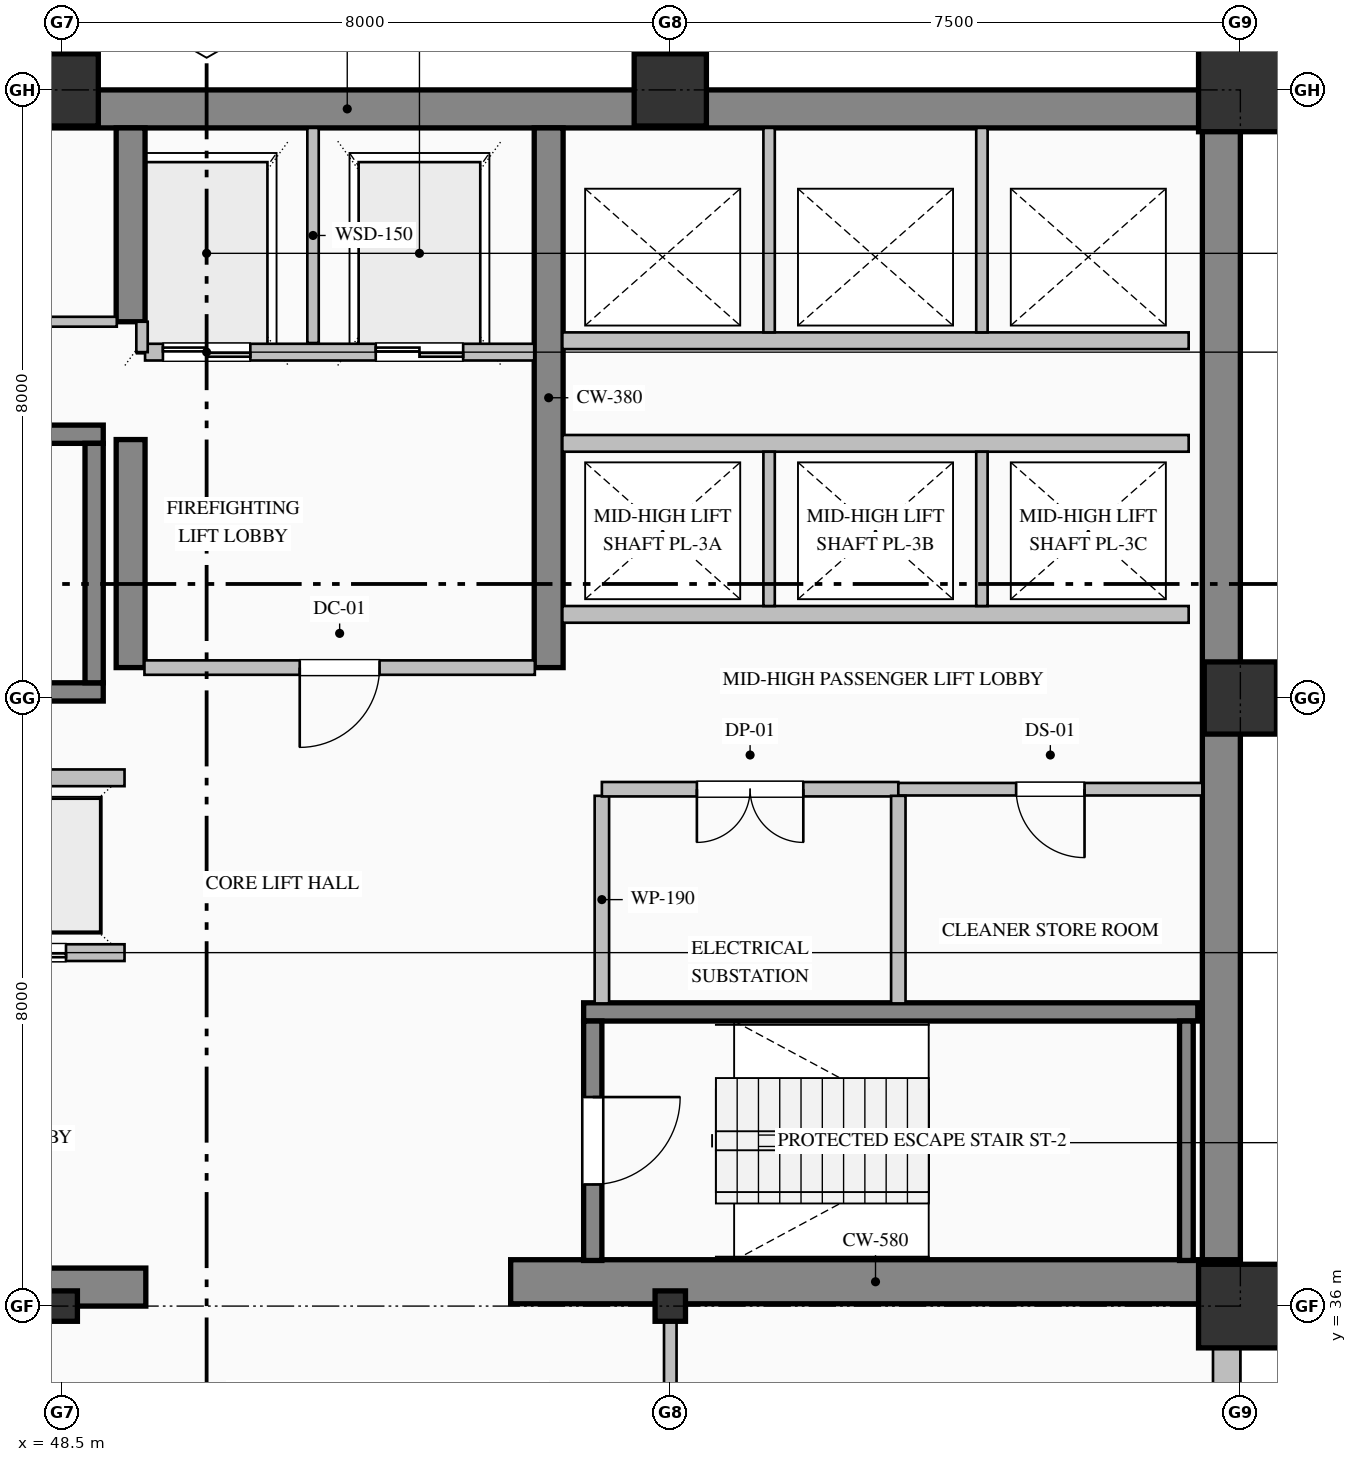
"""IFC4 building model, lengths in metres.
Left out: names, types, materials, properties, quantities, classifications, styles, units other than length and angle.
Written with IfcOpenShell. Run it as: python <this file> out.ifc"""

import sys

from ifc_helpers import new_model, si_unit, direction, frame, frame_2d, origin, origin_2d, place, context, subcontext, project, spatial, rectangle, hollow_rectangle, i_section, extrude, element, fill, save


model = new_model("IFC4")
c1 = context("Model", 3, precision=1e-05, world=origin(), true_north=direction((0.0, 1.0)))
c2 = subcontext(c1, "Body", "Model", "MODEL_VIEW")
j1 = project(units=[si_unit("LENGTHUNIT", "METRE"), si_unit("PLANEANGLEUNIT", "RADIAN")], contexts=[c1])
p1 = place(None, origin())
s1 = spatial("IfcSite", under=j1, at=p1, CompositionType="ELEMENT")
p2 = place(p1, origin())
s2 = spatial("IfcBuilding", under=s1, at=p2, CompositionType="ELEMENT")
p3 = place(p2, frame((0.0, 0.0, 167.0)))
s3 = spatial("IfcBuildingStorey", under=s2, at=p3, CompositionType="ELEMENT", Elevation=167.0)
p4 = place(p3, frame((40.5, 51.75, 0.0), z_axis=(0.0, 0.0, 1.0), x_axis=(1.0, 0.0, 0.0)))
e1 = element("IfcWall", 1, at=p4, inside=s3, PredefinedType="SHEAR", context=c2, shape_type="SweptSolid", body=[
    extrude(rectangle(XDim=23.5, YDim=0.5, at=frame_2d((11.75, 0.0))), origin(), (0.0, 0.0, 1.0), 3.765),
])
p5 = place(p3, frame((63.75, 36.32, 0.0), z_axis=(0.0, 0.0, 1.0), x_axis=(0.0, 1.0, 0.0)))
e2 = element("IfcWall", 2, at=p5, inside=s3, PredefinedType="SHEAR", context=c2, shape_type="SweptSolid", body=[
    extrude(rectangle(XDim=15.18, YDim=0.5, at=frame_2d((7.59, 0.0))), origin(), (0.0, 0.0, 1.0), 3.765),
])
p6 = place(p3, frame((40.5, 36.25, 0.0), z_axis=(0.0, 0.0, 1.0), x_axis=(1.0, 0.0, 0.0)))
e3 = element("IfcWall", 3, at=p6, inside=s3, PredefinedType="SHEAR", context=c2, shape_type="SweptSolid", body=[
    extrude(rectangle(XDim=9.1, YDim=0.5, at=frame_2d((4.55, 0.0))), origin(), (0.0, 0.0, 1.0), 3.765),
])
p7 = place(p3, frame((54.4, 36.32, 0.0), z_axis=(0.0, 0.0, 1.0), x_axis=(1.0, 0.0, 0.0)))
e4 = element("IfcWall", 4, at=p7, inside=s3, PredefinedType="SHEAR", context=c2, shape_type="SweptSolid", body=[
    extrude(rectangle(XDim=9.6, YDim=0.58, at=frame_2d((4.8, 0.0))), origin(), (0.0, 0.0, 1.0), 4.0),
])
p8 = place(p3, frame((49.4, 44.4, 0.0), z_axis=(0.0, 0.0, 1.0), x_axis=(0.0, 1.0, 0.0)))
e5 = element("IfcWall", 5, at=p8, inside=s3, PredefinedType="SHEAR", context=c2, shape_type="SweptSolid", body=[
    extrude(rectangle(XDim=3.0, YDim=0.38, at=frame_2d((1.5, 0.0))), origin(), (0.0, 0.0, 1.0), 3.765),
])
p9 = place(p3, frame((49.4, 48.95, 0.0), z_axis=(0.0, 0.0, 1.0), x_axis=(0.0, 1.0, 0.0)))
e6 = element("IfcWall", 6, at=p9, inside=s3, PredefinedType="SHEAR", context=c2, shape_type="SweptSolid", body=[
    extrude(rectangle(XDim=2.55, YDim=0.38, at=frame_2d((1.275, 0.0))), origin(), (0.0, 0.0, 1.0), 3.765),
])
p10 = place(p3, frame((54.9, 44.4, 0.0), z_axis=(0.0, 0.0, 1.0), x_axis=(0.0, 1.0, 0.0)))
e7 = element("IfcWall", 7, at=p10, inside=s3, PredefinedType="SHEAR", context=c2, shape_type="SweptSolid", body=[
    extrude(rectangle(XDim=7.1, YDim=0.38, at=frame_2d((3.55, 0.0))), origin(), (0.0, 0.0, 1.0), 3.765),
])
p11 = place(p3, frame((48.5, 36.0, 0.0), z_axis=(0.0, 0.0, 1.0), x_axis=(1.0, 0.0, 0.0)))
e8 = element("IfcColumn", 8, at=p11, inside=s3, PredefinedType="COLUMN", context=c2, shape_type="SweptSolid", body=[
    extrude(i_section(OverallWidth=0.4, OverallDepth=0.4, WebThickness=0.013, FlangeThickness=0.021, FilletRadius=0.022, at=origin_2d()), origin(), (0.0, 0.0, 1.0), 4.0),
])
p12 = place(p3, frame((48.5, 52.0, 0.0), z_axis=(0.0, 0.0, 1.0), x_axis=(1.0, 0.0, 0.0)))
e9 = element("IfcColumn", 9, at=p12, inside=s3, PredefinedType="COLUMN", context=c2, shape_type="SweptSolid", body=[
    extrude(hollow_rectangle(XDim=0.95, YDim=0.95, WallThickness=0.036, at=origin_2d()), origin(), (0.0, 0.0, 1.0), 4.0),
])
p13 = place(p3, frame((56.5, 36.0, 0.0), z_axis=(0.0, 0.0, 1.0), x_axis=(1.0, 0.0, 0.0)))
e10 = element("IfcColumn", 10, at=p13, inside=s3, PredefinedType="COLUMN", context=c2, shape_type="SweptSolid", body=[
    extrude(i_section(OverallWidth=0.4, OverallDepth=0.4, WebThickness=0.013, FlangeThickness=0.021, FilletRadius=0.022, at=origin_2d()), origin(), (0.0, 0.0, 1.0), 4.0),
])
p14 = place(p3, frame((56.5, 52.0, 0.0), z_axis=(0.0, 0.0, 1.0), x_axis=(1.0, 0.0, 0.0)))
e11 = element("IfcColumn", 11, at=p14, inside=s3, PredefinedType="COLUMN", context=c2, shape_type="SweptSolid", body=[
    extrude(hollow_rectangle(XDim=0.95, YDim=0.95, WallThickness=0.036, at=origin_2d()), origin(), (0.0, 0.0, 1.0), 4.0),
])
p15 = place(p3, frame((64.0, 36.0, 0.0), z_axis=(0.0, 0.0, 1.0), x_axis=(1.0, 0.0, 0.0)))
e12 = element("IfcColumn", 12, at=p15, inside=s3, PredefinedType="COLUMN", context=c2, shape_type="SweptSolid", body=[
    extrude(hollow_rectangle(XDim=1.1, YDim=1.1, WallThickness=0.04, at=origin_2d()), origin(), (0.0, 0.0, 1.0), 4.0),
])
p16 = place(p3, frame((64.0, 44.0, 0.0), z_axis=(0.0, 0.0, 1.0), x_axis=(1.0, 0.0, 0.0)))
e13 = element("IfcColumn", 13, at=p16, inside=s3, PredefinedType="COLUMN", context=c2, shape_type="SweptSolid", body=[
    extrude(hollow_rectangle(XDim=0.95, YDim=0.95, WallThickness=0.036, at=origin_2d()), origin(), (0.0, 0.0, 1.0), 4.0),
])
p17 = place(p3, frame((64.0, 52.0, 0.0), z_axis=(0.0, 0.0, 1.0), x_axis=(1.0, 0.0, 0.0)))
e14 = element("IfcColumn", 14, at=p17, inside=s3, PredefinedType="COLUMN", context=c2, shape_type="SweptSolid", body=[
    extrude(hollow_rectangle(XDim=1.1, YDim=1.1, WallThickness=0.04, at=origin_2d()), origin(), (0.0, 0.0, 1.0), 4.0),
])
p18 = place(p3, frame((63.82, 36.05, 0.0), z_axis=(0.0, 0.0, 1.0), x_axis=(0.0, -1.0, 0.0)))
e15 = element("IfcWall", 15, at=p18, inside=s3, PredefinedType="SOLIDWALL", context=c2, shape_type="SweptSolid", body=[
    extrude(rectangle(XDim=28.05, YDim=0.36, at=frame_2d((14.025, 0.0))), origin(), (0.0, 0.0, 1.0), 3.265),
])
p19 = place(p18, frame((2.775, 0.0, 0.85)))
e16 = element("IfcOpeningElement", 16, at=p19, cuts=e15, PredefinedType="OPENING", context=c2, shape_type="SweptSolid", body=[
    extrude(rectangle(XDim=1.65, YDim=1.95, at=frame_2d((0.825, 0.975))), frame((0.0, 0.19, 0.0), z_axis=(0.0, -1.0, 0.0), x_axis=(1.0, 0.0, 0.0)), (0.0, 0.0, 1.0), 0.38),
])
p20 = place(p18, frame((13.575, 0.0, 0.85)))
e17 = element("IfcOpeningElement", 17, at=p20, cuts=e15, PredefinedType="OPENING", context=c2, shape_type="SweptSolid", body=[
    extrude(rectangle(XDim=1.65, YDim=1.95, at=frame_2d((0.825, 0.975))), frame((0.0, 0.19, 0.0), z_axis=(0.0, -1.0, 0.0), x_axis=(1.0, 0.0, 0.0)), (0.0, 0.0, 1.0), 0.38),
])
for number, where, z_axis, x_axis in (
    (18, (40.96, 47.47, 0.0), (0.0, 0.0, 1.0), (1.0, 0.0, 0.0)),
    (19, (49.04, 44.08, 0.0), (0.0, 0.0, 1.0), (-1.0, 0.0, 0.0)),
):
    element("IfcWall", number, at=place(p3, frame(where, z_axis=z_axis, x_axis=x_axis)), inside=s3, PredefinedType="SOLIDWALL", context=c2, shape_type="SweptSolid", body=[
        extrude(rectangle(XDim=8.08, YDim=0.24, at=frame_2d((4.04, 0.0))), origin(), (0.0, 0.0, 1.0), 4.0),
    ])
p21 = place(p3, frame((48.92, 44.2, 0.0), z_axis=(0.0, 0.0, 1.0), x_axis=(0.0, 1.0, 0.0)))
e20 = element("IfcWall", 20, at=p21, inside=s3, PredefinedType="SOLIDWALL", context=c2, shape_type="SweptSolid", body=[
    extrude(rectangle(XDim=3.15, YDim=0.24, at=frame_2d((1.575, 0.0))), origin(), (0.0, 0.0, 1.0), 4.0),
])
p22 = place(p3, frame((55.36, 39.87, 0.0), z_axis=(0.0, 0.0, 1.0), x_axis=(1.0, 0.0, 0.0)))
e21 = element("IfcWall", 21, at=p22, inside=s3, PredefinedType="SOLIDWALL", context=c2, shape_type="SweptSolid", body=[
    extrude(rectangle(XDim=8.08, YDim=0.24, at=frame_2d((4.04, 0.0))), origin(), (0.0, 0.0, 1.0), 4.0),
])
p23 = place(p3, frame((55.48, 39.75, 0.0), z_axis=(0.0, 0.0, 1.0), x_axis=(0.0, -1.0, 0.0)))
e22 = element("IfcWall", 22, at=p23, inside=s3, PredefinedType="SOLIDWALL", context=c2, shape_type="SweptSolid", body=[
    extrude(rectangle(XDim=3.15, YDim=0.24, at=frame_2d((1.575, 0.0))), origin(), (0.0, 0.0, 1.0), 4.0),
])
p24 = place(p23, frame((1.0, 0.0, 0.0)))
e23 = element("IfcOpeningElement", 23, at=p24, cuts=e22, PredefinedType="OPENING", context=c2, shape_type="SweptSolid", body=[
    extrude(rectangle(XDim=1.15, YDim=2.2, at=frame_2d((0.575, 1.1))), frame((0.0, 0.13, 0.0), z_axis=(0.0, -1.0, 0.0), x_axis=(1.0, 0.0, 0.0)), (0.0, 0.0, 1.0), 0.26),
])
p25 = place(p3, frame((63.29, 36.6, 0.0), z_axis=(0.0, 0.0, 1.0), x_axis=(0.0, 1.0, 0.0)))
e24 = element("IfcWall", 24, at=p25, inside=s3, PredefinedType="SOLIDWALL", context=c2, shape_type="SweptSolid", body=[
    extrude(rectangle(XDim=3.15, YDim=0.18, at=frame_2d((1.575, 0.0))), origin(), (0.0, 0.0, 1.0), 4.0),
])
p26 = place(p3, frame((54.71, 48.55, 0.0), z_axis=(0.0, 0.0, 1.0), x_axis=(-1.0, 0.0, 0.0)))
e25 = element("IfcWall", 25, at=p26, inside=s3, PredefinedType="PARTITIONING", context=c2, shape_type="SweptSolid", body=[
    extrude(rectangle(XDim=5.12, YDim=0.22, at=frame_2d((2.56, 0.0))), origin(), (0.0, 0.0, 1.0), 3.765),
])
p27 = place(p26, frame((3.735, 0.0, 0.0)))
e26 = element("IfcOpeningElement", 26, at=p27, cuts=e25, PredefinedType="OPENING", context=c2, shape_type="SweptSolid", body=[
    extrude(rectangle(XDim=1.15, YDim=2.2, at=frame_2d((0.575, 1.1))), frame((0.0, 0.12, 0.0), z_axis=(0.0, -1.0, 0.0), x_axis=(1.0, 0.0, 0.0)), (0.0, 0.0, 1.0), 0.24),
])
p28 = place(p26, frame((0.935, 0.0, 0.0)))
e27 = element("IfcOpeningElement", 27, at=p28, cuts=e25, PredefinedType="OPENING", context=c2, shape_type="SweptSolid", body=[
    extrude(rectangle(XDim=1.15, YDim=2.2, at=frame_2d((0.575, 1.1))), frame((0.0, 0.12, 0.0), z_axis=(0.0, -1.0, 0.0), x_axis=(1.0, 0.0, 0.0)), (0.0, 0.0, 1.0), 0.24),
])
p29 = place(p3, frame((51.8, 48.67, 0.0), z_axis=(0.0, 0.0, 1.0), x_axis=(0.0, 1.0, 0.0)))
e28 = element("IfcWall", 28, at=p29, inside=s3, PredefinedType="PARTITIONING", context=c2, shape_type="SweptSolid", body=[
    extrude(rectangle(XDim=2.83, YDim=0.15, at=frame_2d((1.415, 0.0))), origin(), (0.0, 0.0, 1.0), 3.765),
])
p30 = place(p3, frame((49.55, 48.55, 0.0), z_axis=(0.0, 0.0, 1.0), x_axis=(0.0, 1.0, 0.0)))
e29 = element("IfcWall", 29, at=p30, inside=s3, PredefinedType="PARTITIONING", context=c2, shape_type="SweptSolid", body=[
    extrude(rectangle(XDim=0.4, YDim=0.15, at=frame_2d((0.2, 0.0))), origin(), (0.0, 0.0, 1.0), 3.765),
])
p31 = place(p3, frame((49.32, 40.65, 0.0), z_axis=(0.0, 0.0, 1.0), x_axis=(-1.0, 0.0, 0.0)))
e30 = element("IfcWall", 30, at=p31, inside=s3, PredefinedType="PARTITIONING", context=c2, shape_type="SweptSolid", body=[
    extrude(rectangle(XDim=8.24, YDim=0.22, at=frame_2d((4.12, 0.0))), origin(), (0.0, 0.0, 1.0), 3.765),
])
p32 = place(p31, frame((6.37, 0.0, 0.0)))
e31 = element("IfcOpeningElement", 31, at=p32, cuts=e30, PredefinedType="OPENING", context=c2, shape_type="SweptSolid", body=[
    extrude(rectangle(XDim=1.1, YDim=2.2, at=frame_2d((0.55, 1.1))), frame((0.0, 0.12, 0.0), z_axis=(0.0, -1.0, 0.0), x_axis=(1.0, 0.0, 0.0)), (0.0, 0.0, 1.0), 0.24),
])
p33 = place(p31, frame((3.57, 0.0, 0.0)))
e32 = element("IfcOpeningElement", 32, at=p33, cuts=e30, PredefinedType="OPENING", context=c2, shape_type="SweptSolid", body=[
    extrude(rectangle(XDim=1.1, YDim=2.2, at=frame_2d((0.55, 1.1))), frame((0.0, 0.12, 0.0), z_axis=(0.0, -1.0, 0.0), x_axis=(1.0, 0.0, 0.0)), (0.0, 0.0, 1.0), 0.24),
])
p34 = place(p31, frame((0.77, 0.0, 0.0)))
e33 = element("IfcOpeningElement", 33, at=p34, cuts=e30, PredefinedType="OPENING", context=c2, shape_type="SweptSolid", body=[
    extrude(rectangle(XDim=1.1, YDim=2.2, at=frame_2d((0.55, 1.1))), frame((0.0, 0.12, 0.0), z_axis=(0.0, -1.0, 0.0), x_axis=(1.0, 0.0, 0.0)), (0.0, 0.0, 1.0), 0.24),
])
for number, where, z_axis, x_axis in (
    (34, (41.08, 42.95, 0.0), (0.0, 0.0, 1.0), (1.0, 0.0, 0.0)),
    (35, (63.32, 45.1, 0.0), (0.0, 0.0, 1.0), (-1.0, 0.0, 0.0)),
    (36, (55.08, 47.35, 0.0), (0.0, 0.0, 1.0), (1.0, 0.0, 0.0)),
):
    element("IfcWall", number, at=place(p3, frame(where, z_axis=z_axis, x_axis=x_axis)), inside=s3, PredefinedType="PARTITIONING", context=c2, shape_type="SweptSolid", body=[
        extrude(rectangle(XDim=8.24, YDim=0.22, at=frame_2d((4.12, 0.0))), origin(), (0.0, 0.0, 1.0), 3.765),
    ])
for number, where, z_axis, x_axis in (
    (37, (57.8, 45.21, 0.0), (0.0, 0.0, 1.0), (0.0, 1.0, 0.0)),
    (38, (60.6, 45.21, 0.0), (0.0, 0.0, 1.0), (0.0, 1.0, 0.0)),
):
    element("IfcWall", number, at=place(p3, frame(where, z_axis=z_axis, x_axis=x_axis)), inside=s3, PredefinedType="PARTITIONING", context=c2, shape_type="SweptSolid", body=[
        extrude(rectangle(XDim=2.03, YDim=0.15, at=frame_2d((1.015, 0.0))), origin(), (0.0, 0.0, 1.0), 3.765),
    ])
p35 = place(p3, frame((63.32, 48.7, 0.0), z_axis=(0.0, 0.0, 1.0), x_axis=(-1.0, 0.0, 0.0)))
e39 = element("IfcWall", 39, at=p35, inside=s3, PredefinedType="PARTITIONING", context=c2, shape_type="SweptSolid", body=[
    extrude(rectangle(XDim=8.24, YDim=0.22, at=frame_2d((4.12, 0.0))), origin(), (0.0, 0.0, 1.0), 3.765),
])
for number, where, z_axis, x_axis in (
    (40, (57.8, 48.81, 0.0), (0.0, 0.0, 1.0), (0.0, 1.0, 0.0)),
    (41, (60.6, 48.81, 0.0), (0.0, 0.0, 1.0), (0.0, 1.0, 0.0)),
):
    element("IfcWall", number, at=place(p3, frame(where, z_axis=z_axis, x_axis=x_axis)), inside=s3, PredefinedType="PARTITIONING", context=c2, shape_type="SweptSolid", body=[
        extrude(rectangle(XDim=2.69, YDim=0.15, at=frame_2d((1.345, 0.0))), origin(), (0.0, 0.0, 1.0), 3.765),
    ])
p36 = place(p3, frame((45.2, 48.95, 0.0), z_axis=(0.0, 0.0, 1.0), x_axis=(1.0, 0.0, 0.0)))
e42 = element("IfcWall", 42, at=p36, inside=s3, PredefinedType="PARTITIONING", context=c2, shape_type="SweptSolid", body=[
    extrude(rectangle(XDim=4.018, YDim=0.13, at=frame_2d((2.009, 0.0))), origin(), (0.0, 0.0, 1.0), 3.765),
])
p37 = place(p36, frame((1.549, 0.0, 0.0)))
e43 = element("IfcOpeningElement", 43, at=p37, cuts=e42, PredefinedType="OPENING", context=c2, shape_type="SweptSolid", body=[
    extrude(rectangle(XDim=0.92, YDim=2.15, at=frame_2d((0.46, 1.075))), frame((0.0, 0.075, 0.0), z_axis=(0.0, -1.0, 0.0), x_axis=(1.0, 0.0, 0.0)), (0.0, 0.0, 1.0), 0.15),
])
p38 = place(p3, frame((54.718, 44.4, 0.0), z_axis=(0.0, 0.0, 1.0), x_axis=(-1.0, 0.0, 0.0)))
e44 = element("IfcWall", 44, at=p38, inside=s3, PredefinedType="PARTITIONING", context=c2, shape_type="SweptSolid", body=[
    extrude(rectangle(XDim=5.136, YDim=0.19, at=frame_2d((2.568, 0.0))), origin(), (0.0, 0.0, 1.0), 3.765),
])
p39 = place(p38, frame((2.043, 0.0, 0.0)))
e45 = element("IfcOpeningElement", 45, at=p39, cuts=e44, PredefinedType="OPENING", context=c2, shape_type="SweptSolid", body=[
    extrude(rectangle(XDim=1.05, YDim=2.15, at=frame_2d((0.525, 1.075))), frame((0.0, 0.105, 0.0), z_axis=(0.0, -1.0, 0.0), x_axis=(1.0, 0.0, 0.0)), (0.0, 0.0, 1.0), 0.21),
])
p40 = place(p3, frame((55.6, 42.713, 0.0), z_axis=(0.0, 0.0, 1.0), x_axis=(0.0, -1.0, 0.0)))
e46 = element("IfcWall", 46, at=p40, inside=s3, PredefinedType="PARTITIONING", context=c2, shape_type="SweptSolid", body=[
    extrude(rectangle(XDim=2.731, YDim=0.19, at=frame_2d((1.365, 0.0))), origin(), (0.0, 0.0, 1.0), 3.765),
])
p41 = place(p3, frame((59.5, 42.8, 0.0), z_axis=(0.0, 0.0, 1.0), x_axis=(-1.0, 0.0, 0.0)))
e47 = element("IfcWall", 47, at=p41, inside=s3, PredefinedType="PARTITIONING", context=c2, shape_type="SweptSolid", body=[
    extrude(rectangle(XDim=3.9, YDim=0.19, at=frame_2d((1.95, 0.0))), origin(), (0.0, 0.0, 1.0), 3.765),
])
p42 = place(p41, frame((1.25, 0.0, 0.0)))
e48 = element("IfcOpeningElement", 48, at=p42, cuts=e47, PredefinedType="OPENING", context=c2, shape_type="SweptSolid", body=[
    extrude(rectangle(XDim=1.4, YDim=2.25, at=frame_2d((0.7, 1.125))), frame((0.0, 0.105, 0.0), z_axis=(0.0, -1.0, 0.0), x_axis=(1.0, 0.0, 0.0)), (0.0, 0.0, 1.0), 0.21),
])
p43 = place(p3, frame((63.5, 42.8, 0.0), z_axis=(0.0, 0.0, 1.0), x_axis=(-1.0, 0.0, 0.0)))
e49 = element("IfcWall", 49, at=p43, inside=s3, PredefinedType="PARTITIONING", context=c2, shape_type="SweptSolid", body=[
    extrude(rectangle(XDim=4.0, YDim=0.165, at=frame_2d((2.0, 0.0))), origin(), (0.0, 0.0, 1.0), 3.765),
])
p44 = place(p43, frame((1.55, 0.0, 0.0)))
e50 = element("IfcOpeningElement", 50, at=p44, cuts=e49, PredefinedType="OPENING", context=c2, shape_type="SweptSolid", body=[
    extrude(rectangle(XDim=0.9, YDim=2.15, at=frame_2d((0.45, 1.075))), frame((0.0, 0.093, 0.0), z_axis=(0.0, -1.0, 0.0), x_axis=(1.0, 0.0, 0.0)), (0.0, 0.0, 1.0), 0.185),
])
p45 = place(p3, frame((59.5, 42.713, 0.0), z_axis=(0.0, 0.0, 1.0), x_axis=(0.0, -1.0, 0.0)))
e51 = element("IfcWall", 51, at=p45, inside=s3, PredefinedType="PARTITIONING", context=c2, shape_type="SweptSolid", body=[
    extrude(rectangle(XDim=2.731, YDim=0.19, at=frame_2d((1.365, 0.0))), origin(), (0.0, 0.0, 1.0), 3.765),
])
p46 = place(p3, frame((56.5, 36.0, 0.0), z_axis=(0.0, 0.0, 1.0), x_axis=(0.0, -1.0, 0.0)))
e52 = element("IfcWall", 52, at=p46, inside=s3, PredefinedType="PARTITIONING", context=c2, shape_type="SweptSolid", body=[
    extrude(rectangle(XDim=2.325, YDim=0.165, at=frame_2d((1.163, 0.0))), origin(), (0.0, 0.0, 1.0), 3.157),
])
p47 = place(p24, origin())
e53 = element("IfcDoor", 53, at=p47, inside=s3, OperationType="SINGLE_SWING_LEFT", PredefinedType="DOOR", context=c2, shape_type="SweptSolid", body=[
    extrude(rectangle(XDim=1.15, YDim=2.2, at=frame_2d((0.575, 1.1))), frame((0.0, 0.025, 0.0), z_axis=(0.0, -1.0, 0.0), x_axis=(1.0, 0.0, 0.0)), (0.0, 0.0, 1.0), 0.05),
])
fill(e23, e53)
p48 = place(p27, origin())
e54 = element("IfcDoor", 54, at=p48, inside=s3, OperationType="DOUBLE_DOOR_SLIDING", PredefinedType="DOOR", context=c2, shape_type="SweptSolid", body=[
    extrude(rectangle(XDim=1.15, YDim=2.2, at=frame_2d((0.575, 1.1))), frame((0.0, 0.025, 0.0), z_axis=(0.0, -1.0, 0.0), x_axis=(1.0, 0.0, 0.0)), (0.0, 0.0, 1.0), 0.05),
])
fill(e26, e54)
p49 = place(p28, origin())
e55 = element("IfcDoor", 55, at=p49, inside=s3, OperationType="DOUBLE_DOOR_SLIDING", PredefinedType="DOOR", context=c2, shape_type="SweptSolid", body=[
    extrude(rectangle(XDim=1.15, YDim=2.2, at=frame_2d((0.575, 1.1))), frame((0.0, 0.025, 0.0), z_axis=(0.0, -1.0, 0.0), x_axis=(1.0, 0.0, 0.0)), (0.0, 0.0, 1.0), 0.05),
])
fill(e27, e55)
p50 = place(p34, origin())
e56 = element("IfcDoor", 56, at=p50, inside=s3, OperationType="DOUBLE_DOOR_SLIDING", PredefinedType="DOOR", context=c2, shape_type="SweptSolid", body=[
    extrude(rectangle(XDim=1.1, YDim=2.2, at=frame_2d((0.55, 1.1))), frame((0.0, 0.025, 0.0), z_axis=(0.0, -1.0, 0.0), x_axis=(1.0, 0.0, 0.0)), (0.0, 0.0, 1.0), 0.05),
])
fill(e33, e56)
p51 = place(p39, origin())
e57 = element("IfcDoor", 57, at=p51, inside=s3, OperationType="SINGLE_SWING_RIGHT", PredefinedType="DOOR", context=c2, shape_type="SweptSolid", body=[
    extrude(rectangle(XDim=1.05, YDim=2.15, at=frame_2d((0.525, 1.075))), frame((0.0, 0.025, 0.0), z_axis=(0.0, -1.0, 0.0), x_axis=(1.0, 0.0, 0.0)), (0.0, 0.0, 1.0), 0.05),
])
fill(e45, e57)
p52 = place(p42, origin())
e58 = element("IfcDoor", 58, at=p52, inside=s3, OperationType="DOUBLE_DOOR_SINGLE_SWING", PredefinedType="DOOR", context=c2, shape_type="SweptSolid", body=[
    extrude(rectangle(XDim=1.4, YDim=2.25, at=frame_2d((0.7, 1.125))), frame((0.0, 0.025, 0.0), z_axis=(0.0, -1.0, 0.0), x_axis=(1.0, 0.0, 0.0)), (0.0, 0.0, 1.0), 0.05),
])
fill(e48, e58)
p53 = place(p44, origin())
e59 = element("IfcDoor", 59, at=p53, inside=s3, OperationType="SINGLE_SWING_LEFT", PredefinedType="DOOR", context=c2, shape_type="SweptSolid", body=[
    extrude(rectangle(XDim=0.9, YDim=2.15, at=frame_2d((0.45, 1.075))), frame((0.0, 0.025, 0.0), z_axis=(0.0, -1.0, 0.0), x_axis=(1.0, 0.0, 0.0)), (0.0, 0.0, 1.0), 0.05),
])
fill(e50, e59)
save(model, sys.argv[1])
